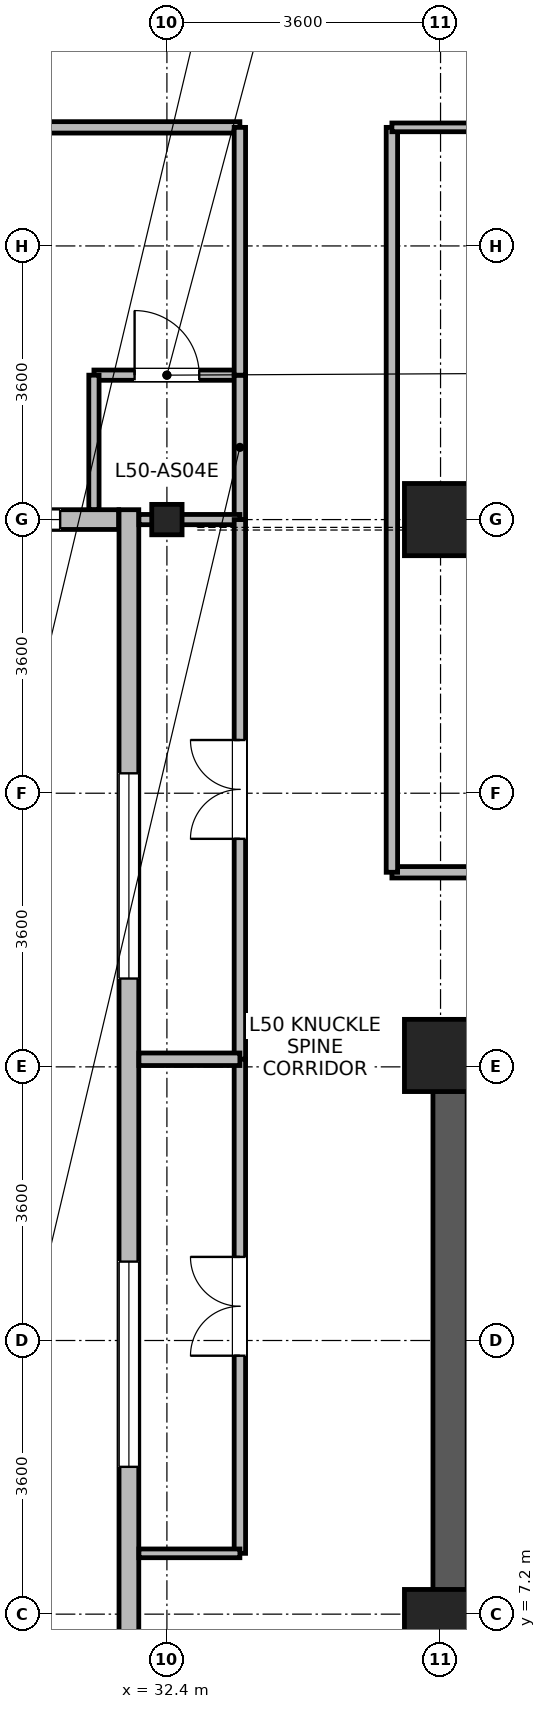
"""IFC4 building model, lengths in metres.
Left out: names, types, materials, properties, quantities, classifications, styles, units other than length and angle.
Written with IfcOpenShell. Run it as: python <this file> out.ifc"""

import sys

from ifc_helpers import new_model, si_unit, direction, frame, frame_2d, origin, origin_2d, place, context, subcontext, project, spatial, rectangle, i_section, extrude, source, transform, mapped, element, fill, save


model = new_model("IFC4")
c1 = context("Model", 3, precision=1e-05, world=origin(), true_north=direction((0.0, 1.0)))
c2 = subcontext(c1, "Body", "Model", "MODEL_VIEW")
j1 = project(units=[si_unit("LENGTHUNIT", "METRE"), si_unit("PLANEANGLEUNIT", "RADIAN")], contexts=[c1])
p1 = place(None, origin())
s1 = spatial("IfcSite", under=j1, at=p1, CompositionType="ELEMENT")
p2 = place(p1, origin())
s2 = spatial("IfcBuilding", under=s1, at=p2, CompositionType="ELEMENT")
p3 = place(p2, frame((0.0, 0.0, 197.2)))
s3 = spatial("IfcBuildingStorey", under=s2, at=p3, CompositionType="ELEMENT", Elevation=197.2)
p4 = place(p3, frame((36.125, 6.85, 0.0), z_axis=(0.0, 0.0, 1.0), x_axis=(0.0, 1.0, 0.0)))
e1 = element("IfcWall", 1, at=p4, inside=s3, PredefinedType="SHEAR", context=c2, shape_type="SweptSolid", body=[
    extrude(rectangle(XDim=7.9, YDim=0.45, at=frame_2d((3.95, 0.0))), origin(), (0.0, 0.0, 1.0), 4.37),
])
m1 = source(origin(), c2, "Body", "SweptSolid", [
    extrude(rectangle(XDim=0.95, YDim=0.95, at=origin_2d()), origin(), (0.0, 0.0, 1.0), 4.6),
])
for number, where, z_axis, x_axis in (
    (2, (36.0, 21.6, 0.0), (0.0, 0.0, 1.0), (1.0, 0.0, 0.0)),
    (3, (36.0, 7.05, 0.0), (0.0, 0.0, 1.0), (1.0, 0.0, 0.0)),
    (4, (36.0, 14.55, 0.0), (0.0, 0.0, 1.0), (1.0, 0.0, 0.0)),
):
    element("IfcColumn", number, at=place(p3, frame(where, z_axis=z_axis, x_axis=x_axis)), inside=s3, PredefinedType="COLUMN", context=c2, shape_type="MappedRepresentation", body=[
        mapped(m1, transform((0.0, 0.0, 0.0), x_axis=(1.0, 0.0, 0.0), y_axis=(0.0, 1.0, 0.0), z_axis=(0.0, 0.0, 1.0), scale=1.0)),
    ])
m2 = source(origin(), c2, "Body", "SweptSolid", [
    extrude(i_section(OverallWidth=0.399, OverallDepth=0.4, WebThickness=0.017, FlangeThickness=0.023, FilletRadius=0.015, at=origin_2d()), origin(), (0.0, 0.0, 1.0), 4.6),
])
p5 = place(p3, frame((32.4, 21.6, 0.0), z_axis=(0.0, 0.0, 1.0), x_axis=(1.0, 0.0, 0.0)))
e5 = element("IfcColumn", 5, at=p5, inside=s3, PredefinedType="COLUMN", context=c2, shape_type="MappedRepresentation", body=[
    mapped(m2, transform((0.0, 0.0, 0.0), x_axis=(1.0, 0.0, 0.0), y_axis=(0.0, 1.0, 0.0), z_axis=(0.0, 0.0, 1.0), scale=1.0)),
])
p6 = place(p3, frame((31.765, 21.6, 0.0), z_axis=(0.0, 0.0, 1.0), x_axis=(-1.0, 0.0, 0.0)))
e6 = element("IfcWall", 6, at=p6, inside=s3, PredefinedType="STANDARD", context=c2, shape_type="SweptSolid", body=[
    extrude(rectangle(XDim=2.489, YDim=0.26, at=frame_2d((1.245, 0.0))), origin(), (0.0, 0.0, 1.0), 3.9),
])
p7 = place(p6, frame((0.77, 0.0, 0.85)))
e7 = element("IfcOpeningElement", 7, at=p7, cuts=e6, PredefinedType="OPENING", context=c2, shape_type="SweptSolid", body=[
    extrude(rectangle(XDim=0.95, YDim=1.75, at=frame_2d((0.475, 0.875))), frame((0.0, 0.14, 0.0), z_axis=(0.0, -1.0, 0.0), x_axis=(1.0, 0.0, 0.0)), (0.0, 0.0, 1.0), 0.28),
])
p8 = place(p3, frame((31.9, 5.67, 0.0), z_axis=(0.0, 0.0, 1.0), x_axis=(0.0, 1.0, 0.0)))
e8 = element("IfcWall", 8, at=p8, inside=s3, PredefinedType="STANDARD", context=c2, shape_type="SweptSolid", body=[
    extrude(rectangle(XDim=16.06, YDim=0.26, at=frame_2d((8.03, 0.0))), origin(), (0.0, 0.0, 1.0), 4.35),
])
p9 = place(p8, frame((3.468, 0.0, 0.85)))
e9 = element("IfcOpeningElement", 9, at=p9, cuts=e8, PredefinedType="OPENING", context=c2, shape_type="SweptSolid", body=[
    extrude(rectangle(XDim=2.7, YDim=2.05, at=frame_2d((1.35, 1.025))), frame((0.0, 0.14, 0.0), z_axis=(0.0, -1.0, 0.0), x_axis=(1.0, 0.0, 0.0)), (0.0, 0.0, 1.0), 0.28),
])
p10 = place(p8, frame((9.892, 0.0, 0.85)))
e10 = element("IfcOpeningElement", 10, at=p10, cuts=e8, PredefinedType="OPENING", context=c2, shape_type="SweptSolid", body=[
    extrude(rectangle(XDim=2.7, YDim=2.05, at=frame_2d((1.35, 1.025))), frame((0.0, 0.14, 0.0), z_axis=(0.0, -1.0, 0.0), x_axis=(1.0, 0.0, 0.0)), (0.0, 0.0, 1.0), 0.28),
])
p11 = place(p3, frame((31.44, 23.5, 0.0), z_axis=(0.0, 0.0, 1.0), x_axis=(1.0, 0.0, 0.0)))
e11 = element("IfcWall", 11, at=p11, inside=s3, PredefinedType="PARTITIONING", context=c2, shape_type="SweptSolid", body=[
    extrude(rectangle(XDim=1.92, YDim=0.135, at=frame_2d((0.96, 0.0))), origin(), (0.0, 0.0, 1.0), 4.35),
])
p12 = place(p11, frame((0.535, 0.0, 0.0)))
e12 = element("IfcOpeningElement", 12, at=p12, cuts=e11, PredefinedType="OPENING", context=c2, shape_type="SweptSolid", body=[
    extrude(rectangle(XDim=0.85, YDim=2.04, at=frame_2d((0.425, 1.02))), frame((0.0, 0.078, 0.0), z_axis=(0.0, -1.0, 0.0), x_axis=(1.0, 0.0, 0.0)), (0.0, 0.0, 1.0), 0.155),
])
p13 = place(p3, frame((31.44, 21.732, 0.0), z_axis=(0.0, 0.0, 1.0), x_axis=(0.0, 1.0, 0.0)))
e13 = element("IfcWall", 13, at=p13, inside=s3, PredefinedType="PARTITIONING", context=c2, shape_type="SweptSolid", body=[
    extrude(rectangle(XDim=1.768, YDim=0.135, at=frame_2d((0.884, 0.0))), origin(), (0.0, 0.0, 1.0), 4.35),
])
p14 = place(p3, frame((33.36, 21.6, 0.0), z_axis=(0.0, 0.0, 1.0), x_axis=(0.0, 1.0, 0.0)))
e14 = element("IfcWall", 14, at=p14, inside=s3, PredefinedType="PARTITIONING", context=c2, shape_type="SweptSolid", body=[
    extrude(rectangle(XDim=1.9, YDim=0.15, at=frame_2d((0.95, 0.0))), origin(), (0.0, 0.0, 1.0), 4.35),
])
p15 = place(p3, frame((32.032, 21.6, 0.0), z_axis=(0.0, 0.0, 1.0), x_axis=(1.0, 0.0, 0.0)))
e15 = element("IfcWall", 15, at=p15, inside=s3, PredefinedType="PARTITIONING", context=c2, shape_type="SweptSolid", body=[
    extrude(rectangle(XDim=1.328, YDim=0.135, at=frame_2d((0.664, 0.0))), origin(), (0.0, 0.0, 1.0), 3.9),
])
p16 = place(p3, frame((35.36, 16.96, 0.0), z_axis=(0.0, 0.0, 1.0), x_axis=(1.0, 0.0, 0.0)))
e16 = element("IfcWall", 16, at=p16, inside=s3, PredefinedType="PARTITIONING", context=c2, shape_type="SweptSolid", body=[
    extrude(rectangle(XDim=10.58, YDim=0.15, at=frame_2d((5.29, 0.0))), origin(), (0.0, 0.0, 1.0), 4.35),
])
p17 = place(p16, frame((4.64, 0.0, 0.0)))
e17 = element("IfcOpeningElement", 17, at=p17, cuts=e16, PredefinedType="OPENING", context=c2, shape_type="SweptSolid", body=[
    extrude(rectangle(XDim=1.3, YDim=2.12, at=frame_2d((0.65, 1.06))), frame((0.0, 0.085, 0.0), z_axis=(0.0, -1.0, 0.0), x_axis=(1.0, 0.0, 0.0)), (0.0, 0.0, 1.0), 0.17),
])
p18 = place(p3, frame((35.36, 16.96, 0.0), z_axis=(0.0, 0.0, 1.0), x_axis=(0.0, 1.0, 0.0)))
e18 = element("IfcWall", 18, at=p18, inside=s3, PredefinedType="PARTITIONING", context=c2, shape_type="SweptSolid", body=[
    extrude(rectangle(XDim=9.8, YDim=0.15, at=frame_2d((4.9, 0.0))), origin(), (0.0, 0.0, 1.0), 4.35),
])
p19 = place(p3, frame((24.5, 26.76, 0.0), z_axis=(0.0, 0.0, 1.0), x_axis=(1.0, 0.0, 0.0)))
e19 = element("IfcWall", 19, at=p19, inside=s3, PredefinedType="PARTITIONING", context=c2, shape_type="SweptSolid", body=[
    extrude(rectangle(XDim=8.86, YDim=0.15, at=frame_2d((4.43, 0.0))), origin(), (0.0, 0.0, 1.0), 4.35),
])
p20 = place(p19, frame((3.955, 0.0, 0.0)))
e20 = element("IfcOpeningElement", 20, at=p20, cuts=e19, PredefinedType="OPENING", context=c2, shape_type="SweptSolid", body=[
    extrude(rectangle(XDim=0.95, YDim=2.1, at=frame_2d((0.475, 1.05))), frame((0.0, 0.085, 0.0), z_axis=(0.0, -1.0, 0.0), x_axis=(1.0, 0.0, 0.0)), (0.0, 0.0, 1.0), 0.17),
])
p21 = place(p3, frame((33.36, 14.5, 0.0), z_axis=(0.0, 0.0, 1.0), x_axis=(0.0, 1.0, 0.0)))
e21 = element("IfcWall", 21, at=p21, inside=s3, PredefinedType="PARTITIONING", context=c2, shape_type="SweptSolid", body=[
    extrude(rectangle(XDim=7.1, YDim=0.15, at=frame_2d((3.55, 0.0))), origin(), (0.0, 0.0, 1.0), 4.35),
])
p22 = place(p21, frame((2.9, 0.0, 0.0)))
e22 = element("IfcOpeningElement", 22, at=p22, cuts=e21, PredefinedType="OPENING", context=c2, shape_type="SweptSolid", body=[
    extrude(rectangle(XDim=1.3, YDim=2.12, at=frame_2d((0.65, 1.06))), frame((0.0, 0.085, 0.0), z_axis=(0.0, -1.0, 0.0), x_axis=(1.0, 0.0, 0.0)), (0.0, 0.0, 1.0), 0.17),
])
p23 = place(p3, frame((33.36, 8.0, 0.0), z_axis=(0.0, 0.0, 1.0), x_axis=(0.0, 1.0, 0.0)))
e23 = element("IfcWall", 23, at=p23, inside=s3, PredefinedType="PARTITIONING", context=c2, shape_type="SweptSolid", body=[
    extrude(rectangle(XDim=6.5, YDim=0.15, at=frame_2d((3.25, 0.0))), origin(), (0.0, 0.0, 1.0), 4.35),
])
p24 = place(p23, frame((2.6, 0.0, 0.0)))
e24 = element("IfcOpeningElement", 24, at=p24, cuts=e23, PredefinedType="OPENING", context=c2, shape_type="SweptSolid", body=[
    extrude(rectangle(XDim=1.3, YDim=2.12, at=frame_2d((0.65, 1.06))), frame((0.0, 0.085, 0.0), z_axis=(0.0, -1.0, 0.0), x_axis=(1.0, 0.0, 0.0)), (0.0, 0.0, 1.0), 0.17),
])
p25 = place(p3, frame((33.36, 23.5, 0.0), z_axis=(0.0, 0.0, 1.0), x_axis=(0.0, 1.0, 0.0)))
e25 = element("IfcWall", 25, at=p25, inside=s3, PredefinedType="PARTITIONING", context=c2, shape_type="SweptSolid", body=[
    extrude(rectangle(XDim=3.26, YDim=0.15, at=frame_2d((1.63, 0.0))), origin(), (0.0, 0.0, 1.0), 4.35),
])
p26 = place(p3, frame((35.36, 26.76, 0.0), z_axis=(0.0, 0.0, 1.0), x_axis=(1.0, 0.0, 0.0)))
e26 = element("IfcWall", 26, at=p26, inside=s3, PredefinedType="PARTITIONING", context=c2, shape_type="SweptSolid", body=[
    extrude(rectangle(XDim=10.58, YDim=0.115, at=frame_2d((5.29, 0.0))), origin(), (0.0, 0.0, 1.0), 4.35),
])
p27 = place(p3, frame((32.032, 8.0, 0.0), z_axis=(0.0, 0.0, 1.0), x_axis=(1.0, 0.0, 0.0)))
e27 = element("IfcWall", 27, at=p27, inside=s3, PredefinedType="PARTITIONING", context=c2, shape_type="SweptSolid", body=[
    extrude(rectangle(XDim=1.328, YDim=0.115, at=frame_2d((0.664, 0.0))), origin(), (0.0, 0.0, 1.0), 4.35),
])
p28 = place(p3, frame((32.032, 14.5, 0.0), z_axis=(0.0, 0.0, 1.0), x_axis=(1.0, 0.0, 0.0)))
e28 = element("IfcWall", 28, at=p28, inside=s3, PredefinedType="PARTITIONING", context=c2, shape_type="SweptSolid", body=[
    extrude(rectangle(XDim=1.328, YDim=0.165, at=frame_2d((0.664, 0.0))), origin(), (0.0, 0.0, 1.0), 4.35),
])
p29 = place(p7, origin())
e29 = element("IfcWindow", 29, at=p29, inside=s3, PartitioningType="SINGLE_PANEL", PredefinedType="WINDOW", context=c2, shape_type="SweptSolid", body=[
    extrude(rectangle(XDim=0.95, YDim=1.75, at=frame_2d((0.475, 0.875))), frame((0.0, 0.03, 0.0), z_axis=(0.0, -1.0, 0.0), x_axis=(1.0, 0.0, 0.0)), (0.0, 0.0, 1.0), 0.06),
])
fill(e7, e29)
p30 = place(p9, origin())
e30 = element("IfcWindow", 30, at=p30, inside=s3, PartitioningType="SINGLE_PANEL", PredefinedType="WINDOW", context=c2, shape_type="SweptSolid", body=[
    extrude(rectangle(XDim=2.7, YDim=2.05, at=frame_2d((1.35, 1.025))), frame((0.0, 0.03, 0.0), z_axis=(0.0, -1.0, 0.0), x_axis=(1.0, 0.0, 0.0)), (0.0, 0.0, 1.0), 0.06),
])
fill(e9, e30)
p31 = place(p10, origin())
e31 = element("IfcWindow", 31, at=p31, inside=s3, PartitioningType="SINGLE_PANEL", PredefinedType="WINDOW", context=c2, shape_type="SweptSolid", body=[
    extrude(rectangle(XDim=2.7, YDim=2.05, at=frame_2d((1.35, 1.025))), frame((0.0, 0.03, 0.0), z_axis=(0.0, -1.0, 0.0), x_axis=(1.0, 0.0, 0.0)), (0.0, 0.0, 1.0), 0.06),
])
fill(e10, e31)
p32 = place(p12, origin())
e32 = element("IfcDoor", 32, at=p32, inside=s3, OperationType="SINGLE_SWING_LEFT", PredefinedType="DOOR", context=c2, shape_type="SweptSolid", body=[
    extrude(rectangle(XDim=0.85, YDim=2.04, at=frame_2d((0.425, 1.02))), frame((0.0, 0.025, 0.0), z_axis=(0.0, -1.0, 0.0), x_axis=(1.0, 0.0, 0.0)), (0.0, 0.0, 1.0), 0.05),
])
fill(e12, e32)
p33 = place(p22, origin())
e33 = element("IfcDoor", 33, at=p33, inside=s3, OperationType="DOUBLE_DOOR_SINGLE_SWING", PredefinedType="DOOR", context=c2, shape_type="SweptSolid", body=[
    extrude(rectangle(XDim=1.3, YDim=2.12, at=frame_2d((0.65, 1.06))), frame((0.0, 0.025, 0.0), z_axis=(0.0, -1.0, 0.0), x_axis=(1.0, 0.0, 0.0)), (0.0, 0.0, 1.0), 0.05),
])
fill(e22, e33)
p34 = place(p24, origin())
e34 = element("IfcDoor", 34, at=p34, inside=s3, OperationType="DOUBLE_DOOR_SINGLE_SWING", PredefinedType="DOOR", context=c2, shape_type="SweptSolid", body=[
    extrude(rectangle(XDim=1.3, YDim=2.12, at=frame_2d((0.65, 1.06))), frame((0.0, 0.025, 0.0), z_axis=(0.0, -1.0, 0.0), x_axis=(1.0, 0.0, 0.0)), (0.0, 0.0, 1.0), 0.05),
])
fill(e24, e34)
save(model, sys.argv[1])
